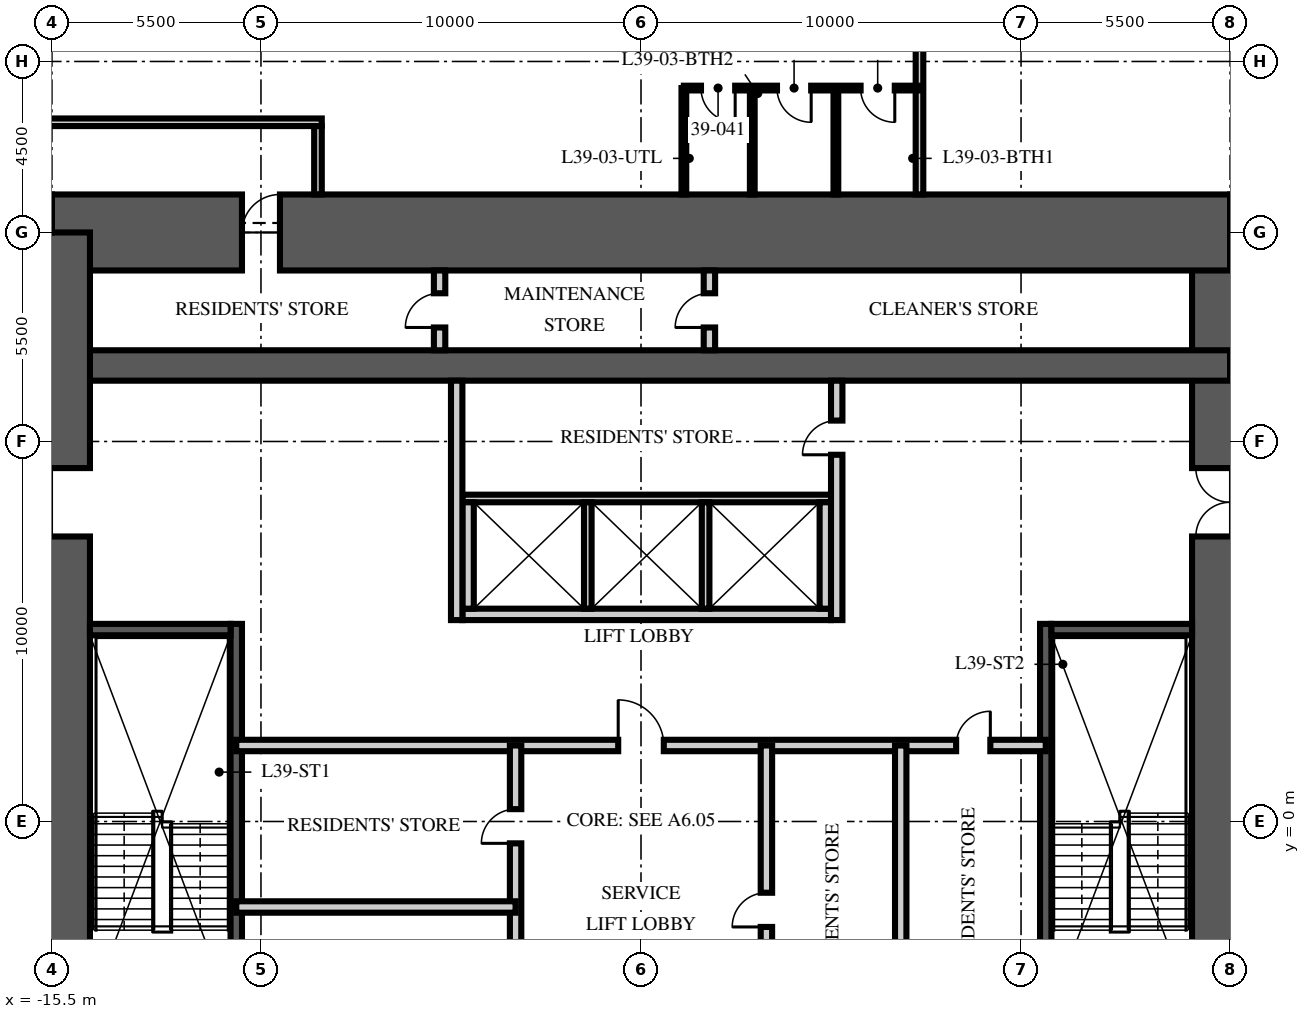
"""IFC4 building model, lengths in metres.
Left out: names, types, materials, properties, quantities, classifications, styles, units other than length and angle.
Written with IfcOpenShell. Run it as: python <this file> out.ifc"""

import sys

from ifc_helpers import new_model, si_unit, direction, frame, frame_2d, origin, place, context, subcontext, project, spatial, rectangle, extrude, element, fill, save


model = new_model("IFC4")
c1 = context("Model", 3, precision=1e-05, world=origin(), true_north=direction((0.0, 1.0)))
c2 = subcontext(c1, "Body", "Model", "MODEL_VIEW")
j1 = project(units=[si_unit("LENGTHUNIT", "METRE"), si_unit("PLANEANGLEUNIT", "RADIAN")], contexts=[c1])
p1 = place(None, origin())
s1 = spatial("IfcSite", under=j1, at=p1, CompositionType="ELEMENT")
p2 = place(p1, origin())
s2 = spatial("IfcBuilding", under=s1, at=p2, CompositionType="ELEMENT")
p3 = place(p2, frame((0.0, 0.0, 156.0)))
s3 = spatial("IfcBuildingStorey", under=s2, at=p3, CompositionType="ELEMENT", Elevation=156.0)
p4 = place(p3, frame((15.5, -15.5, -0.25), z_axis=(0.0, 0.0, 1.0), x_axis=(0.0, 1.0, 0.0)))
e1 = element("IfcWall", 1, at=p4, inside=s3, PredefinedType="SHEAR", context=c2, shape_type="SweptSolid", body=[
    extrude(rectangle(XDim=31.0, YDim=2.0, at=frame_2d((15.5, 0.0))), origin(), (0.0, 0.0, 1.0), 3.75),
])
p5 = place(p4, frame((6.5, 0.0, 0.25)))
e2 = element("IfcOpeningElement", 2, at=p5, cuts=e1, PredefinedType="OPENING", context=c2, shape_type="SweptSolid", body=[
    extrude(rectangle(XDim=1.2, YDim=2.1, at=frame_2d((0.6, 1.05))), frame((0.0, 1.01, 0.0), z_axis=(0.0, -1.0, 0.0), x_axis=(1.0, 0.0, 0.0)), (0.0, 0.0, 1.0), 2.02),
])
p6 = place(p4, frame((23.0, 0.0, 0.25)))
e3 = element("IfcOpeningElement", 3, at=p6, cuts=e1, PredefinedType="OPENING", context=c2, shape_type="SweptSolid", body=[
    extrude(rectangle(XDim=1.8, YDim=2.1, at=frame_2d((0.9, 1.05))), frame((0.0, 1.01, 0.0), z_axis=(0.0, -1.0, 0.0), x_axis=(1.0, 0.0, 0.0)), (0.0, 0.0, 1.0), 2.02),
])
p7 = place(p3, frame((-15.5, 15.5, -0.25), z_axis=(0.0, 0.0, 1.0), x_axis=(1.0, 0.0, 0.0)))
e4 = element("IfcWall", 4, at=p7, inside=s3, PredefinedType="SHEAR", context=c2, shape_type="SweptSolid", body=[
    extrude(rectangle(XDim=31.0, YDim=2.0, at=frame_2d((15.5, 0.0))), origin(), (0.0, 0.0, 1.0), 3.75),
])
p8 = place(p7, frame((5.0, 0.0, 0.25)))
e5 = element("IfcOpeningElement", 5, at=p8, cuts=e4, PredefinedType="OPENING", context=c2, shape_type="SweptSolid", body=[
    extrude(rectangle(XDim=1.0, YDim=2.1, at=frame_2d((0.5, 1.05))), frame((0.0, 1.01, 0.0), z_axis=(0.0, -1.0, 0.0), x_axis=(1.0, 0.0, 0.0)), (0.0, 0.0, 1.0), 2.02),
])
p9 = place(p3, frame((-15.5, 12.0, -0.25), z_axis=(0.0, 0.0, 1.0), x_axis=(1.0, 0.0, 0.0)))
e6 = element("IfcWall", 6, at=p9, inside=s3, PredefinedType="SHEAR", context=c2, shape_type="SweptSolid", body=[
    extrude(rectangle(XDim=31.0, YDim=0.8, at=frame_2d((15.5, 0.0))), origin(), (0.0, 0.0, 1.0), 3.75),
])
p10 = place(p3, frame((-15.5, -15.5, -0.25), z_axis=(0.0, 0.0, 1.0), x_axis=(0.0, 1.0, 0.0)))
e7 = element("IfcWall", 7, at=p10, inside=s3, PredefinedType="SHEAR", context=c2, shape_type="SweptSolid", body=[
    extrude(rectangle(XDim=31.0, YDim=2.0, at=frame_2d((15.5, 0.0))), origin(), (0.0, 0.0, 1.0), 3.75),
])
p11 = place(p10, frame((6.5, 0.0, 0.25)))
e8 = element("IfcOpeningElement", 8, at=p11, cuts=e7, PredefinedType="OPENING", context=c2, shape_type="SweptSolid", body=[
    extrude(rectangle(XDim=1.2, YDim=2.1, at=frame_2d((0.6, 1.05))), frame((0.0, 1.01, 0.0), z_axis=(0.0, -1.0, 0.0), x_axis=(1.0, 0.0, 0.0)), (0.0, 0.0, 1.0), 2.02),
])
p12 = place(p10, frame((23.0, 0.0, 0.25)))
e9 = element("IfcOpeningElement", 9, at=p12, cuts=e7, PredefinedType="OPENING", context=c2, shape_type="SweptSolid", body=[
    extrude(rectangle(XDim=1.8, YDim=2.1, at=frame_2d((0.9, 1.05))), frame((0.0, 1.01, 0.0), z_axis=(0.0, -1.0, 0.0), x_axis=(1.0, 0.0, 0.0)), (0.0, 0.0, 1.0), 2.02),
])
p13 = place(p3, frame((-10.65, -4.9, 0.0), z_axis=(0.0, 0.0, 1.0), x_axis=(0.0, 1.0, 0.0)))
e10 = element("IfcWall", 10, at=p13, inside=s3, PredefinedType="SOLIDWALL", context=c2, shape_type="SweptSolid", body=[
    extrude(rectangle(XDim=10.1, YDim=0.3, at=frame_2d((5.05, 0.0))), origin(), (0.0, 0.0, 1.0), 3.5),
])
p14 = place(p3, frame((-14.5, 5.05, 0.0), z_axis=(0.0, 0.0, 1.0), x_axis=(1.0, 0.0, 0.0)))
e11 = element("IfcWall", 11, at=p14, inside=s3, PredefinedType="SOLIDWALL", context=c2, shape_type="SweptSolid", body=[
    extrude(rectangle(XDim=3.7, YDim=0.3, at=frame_2d((1.85, 0.0))), origin(), (0.0, 0.0, 1.0), 3.5),
])
p15 = place(p3, frame((10.65, -4.9, 0.0), z_axis=(0.0, 0.0, 1.0), x_axis=(0.0, 1.0, 0.0)))
e12 = element("IfcWall", 12, at=p15, inside=s3, PredefinedType="SOLIDWALL", context=c2, shape_type="SweptSolid", body=[
    extrude(rectangle(XDim=10.1, YDim=0.3, at=frame_2d((5.05, 0.0))), origin(), (0.0, 0.0, 1.0), 3.5),
])
p16 = place(p3, frame((14.5, 5.05, 0.0), z_axis=(0.0, 0.0, 1.0), x_axis=(-1.0, 0.0, 0.0)))
e13 = element("IfcWall", 13, at=p16, inside=s3, PredefinedType="SOLIDWALL", context=c2, shape_type="SweptSolid", body=[
    extrude(rectangle(XDim=3.7, YDim=0.3, at=frame_2d((1.85, 0.0))), origin(), (0.0, 0.0, 1.0), 3.5),
])
p17 = place(p3, frame((-4.7, 5.45, 0.0), z_axis=(0.0, 0.0, 1.0), x_axis=(1.0, 0.0, 0.0)))
e14 = element("IfcWall", 14, at=p17, inside=s3, PredefinedType="PARTITIONING", context=c2, shape_type="SweptSolid", body=[
    extrude(rectangle(XDim=9.7, YDim=0.3, at=frame_2d((4.85, 0.0))), origin(), (0.0, 0.0, 1.0), 3.5),
])
p18 = place(p3, frame((-4.7, 8.5, 0.0), z_axis=(0.0, 0.0, 1.0), x_axis=(1.0, 0.0, 0.0)))
e15 = element("IfcWall", 15, at=p18, inside=s3, PredefinedType="PARTITIONING", context=c2, shape_type="SweptSolid", body=[
    extrude(rectangle(XDim=9.7, YDim=0.2, at=frame_2d((4.85, 0.0))), origin(), (0.0, 0.0, 1.0), 3.5),
])
for number, where, z_axis, x_axis in (
    (16, (-4.55, 5.6, 0.0), (0.0, 0.0, 1.0), (0.0, 1.0, 0.0)),
    (17, (4.85, 5.6, 0.0), (0.0, 0.0, 1.0), (0.0, 1.0, 0.0)),
):
    element("IfcWall", number, at=place(p3, frame(where, z_axis=z_axis, x_axis=x_axis)), inside=s3, PredefinedType="PARTITIONING", context=c2, shape_type="SweptSolid", body=[
        extrude(rectangle(XDim=2.8, YDim=0.3, at=frame_2d((1.4, 0.0))), origin(), (0.0, 0.0, 1.0), 3.5),
    ])
for number, where, z_axis, x_axis in (
    (18, (-1.4, 5.6, 0.0), (0.0, 0.0, 1.0), (0.0, 1.0, 0.0)),
    (19, (1.7, 5.6, 0.0), (0.0, 0.0, 1.0), (0.0, 1.0, 0.0)),
):
    element("IfcWall", number, at=place(p3, frame(where, z_axis=z_axis, x_axis=x_axis)), inside=s3, PredefinedType="PARTITIONING", context=c2, shape_type="SweptSolid", body=[
        extrude(rectangle(XDim=2.8, YDim=0.2, at=frame_2d((1.4, 0.0))), origin(), (0.0, 0.0, 1.0), 3.5),
    ])
p19 = place(p3, frame((-10.65, 2.0, 0.0), z_axis=(0.0, 0.0, 1.0), x_axis=(1.0, 0.0, 0.0)))
e20 = element("IfcWall", 20, at=p19, inside=s3, PredefinedType="PARTITIONING", context=c2, shape_type="SweptSolid", body=[
    extrude(rectangle(XDim=21.3, YDim=0.3, at=frame_2d((10.65, 0.0))), origin(), (0.0, 0.0, 1.0), 3.5),
])
p20 = place(p19, frame((10.05, 0.0, 0.0)))
e21 = element("IfcOpeningElement", 21, at=p20, cuts=e20, PredefinedType="OPENING", context=c2, shape_type="SweptSolid", body=[
    extrude(rectangle(XDim=1.2, YDim=2.1, at=frame_2d((0.6, 1.05))), frame((0.0, 0.16, 0.0), z_axis=(0.0, -1.0, 0.0), x_axis=(1.0, 0.0, 0.0)), (0.0, 0.0, 1.0), 0.32),
])
p21 = place(p19, frame((18.942, 0.0, 0.0)))
e22 = element("IfcOpeningElement", 22, at=p21, cuts=e20, PredefinedType="OPENING", context=c2, shape_type="SweptSolid", body=[
    extrude(rectangle(XDim=0.9, YDim=2.1, at=frame_2d((0.45, 1.05))), frame((0.0, 0.16, 0.0), z_axis=(0.0, -1.0, 0.0), x_axis=(1.0, 0.0, 0.0)), (0.0, 0.0, 1.0), 0.32),
])
p22 = place(p3, frame((-3.3, -6.65, 0.0), z_axis=(0.0, 0.0, 1.0), x_axis=(0.0, 1.0, 0.0)))
e23 = element("IfcWall", 23, at=p22, inside=s3, PredefinedType="PARTITIONING", context=c2, shape_type="SweptSolid", body=[
    extrude(rectangle(XDim=8.65, YDim=0.3, at=frame_2d((4.325, 0.0))), origin(), (0.0, 0.0, 1.0), 3.5),
])
p23 = place(p22, frame((1.75, 0.0, 0.0)))
e24 = element("IfcOpeningElement", 24, at=p23, cuts=e23, PredefinedType="OPENING", context=c2, shape_type="SweptSolid", body=[
    extrude(rectangle(XDim=0.9, YDim=2.1, at=frame_2d((0.45, 1.05))), frame((0.0, 0.16, 0.0), z_axis=(0.0, -1.0, 0.0), x_axis=(1.0, 0.0, 0.0)), (0.0, 0.0, 1.0), 0.32),
])
p24 = place(p22, frame((6.075, 0.0, 0.0)))
e25 = element("IfcOpeningElement", 25, at=p24, cuts=e23, PredefinedType="OPENING", context=c2, shape_type="SweptSolid", body=[
    extrude(rectangle(XDim=0.9, YDim=2.1, at=frame_2d((0.45, 1.05))), frame((0.0, 0.16, 0.0), z_axis=(0.0, -1.0, 0.0), x_axis=(1.0, 0.0, 0.0)), (0.0, 0.0, 1.0), 0.32),
])
p25 = place(p3, frame((3.3, -6.65, 0.0), z_axis=(0.0, 0.0, 1.0), x_axis=(0.0, 1.0, 0.0)))
e26 = element("IfcWall", 26, at=p25, inside=s3, PredefinedType="PARTITIONING", context=c2, shape_type="SweptSolid", body=[
    extrude(rectangle(XDim=8.65, YDim=0.3, at=frame_2d((4.325, 0.0))), origin(), (0.0, 0.0, 1.0), 3.5),
])
p26 = place(p25, frame((3.875, 0.0, 0.0)))
e27 = element("IfcOpeningElement", 27, at=p26, cuts=e26, PredefinedType="OPENING", context=c2, shape_type="SweptSolid", body=[
    extrude(rectangle(XDim=0.9, YDim=2.1, at=frame_2d((0.45, 1.05))), frame((0.0, 0.16, 0.0), z_axis=(0.0, -1.0, 0.0), x_axis=(1.0, 0.0, 0.0)), (0.0, 0.0, 1.0), 0.32),
])
p27 = place(p3, frame((-10.65, -2.25, 0.0), z_axis=(0.0, 0.0, 1.0), x_axis=(1.0, 0.0, 0.0)))
e28 = element("IfcWall", 28, at=p27, inside=s3, PredefinedType="PARTITIONING", context=c2, shape_type="SweptSolid", body=[
    extrude(rectangle(XDim=7.35, YDim=0.3, at=frame_2d((3.675, 0.0))), origin(), (0.0, 0.0, 1.0), 3.5),
])
p28 = place(p3, frame((6.834, -6.65, 0.0), z_axis=(0.0, 0.0, 1.0), x_axis=(0.0, 1.0, 0.0)))
e29 = element("IfcWall", 29, at=p28, inside=s3, PredefinedType="PARTITIONING", context=c2, shape_type="SweptSolid", body=[
    extrude(rectangle(XDim=8.65, YDim=0.3, at=frame_2d((4.325, 0.0))), origin(), (0.0, 0.0, 1.0), 3.5),
])
p29 = place(p3, frame((-4.85, 5.3, 0.0), z_axis=(0.0, 0.0, 1.0), x_axis=(0.0, 1.0, 0.0)))
e30 = element("IfcWall", 30, at=p29, inside=s3, PredefinedType="PARTITIONING", context=c2, shape_type="SweptSolid", body=[
    extrude(rectangle(XDim=6.3, YDim=0.3, at=frame_2d((3.15, 0.0))), origin(), (0.0, 0.0, 1.0), 3.5),
])
p30 = place(p3, frame((5.15, 5.3, 0.0), z_axis=(0.0, 0.0, 1.0), x_axis=(0.0, 1.0, 0.0)))
e31 = element("IfcWall", 31, at=p30, inside=s3, PredefinedType="PARTITIONING", context=c2, shape_type="SweptSolid", body=[
    extrude(rectangle(XDim=6.3, YDim=0.3, at=frame_2d((3.15, 0.0))), origin(), (0.0, 0.0, 1.0), 3.5),
])
p31 = place(p30, frame((4.35, 0.0, 0.0)))
e32 = element("IfcOpeningElement", 32, at=p31, cuts=e31, PredefinedType="OPENING", context=c2, shape_type="SweptSolid", body=[
    extrude(rectangle(XDim=0.9, YDim=2.1, at=frame_2d((0.45, 1.05))), frame((0.0, 0.16, 0.0), z_axis=(0.0, -1.0, 0.0), x_axis=(1.0, 0.0, 0.0)), (0.0, 0.0, 1.0), 0.32),
])
p32 = place(p3, frame((-5.3, 12.4, 0.0), z_axis=(0.0, 0.0, 1.0), x_axis=(0.0, 1.0, 0.0)))
e33 = element("IfcWall", 33, at=p32, inside=s3, PredefinedType="PARTITIONING", context=c2, shape_type="SweptSolid", body=[
    extrude(rectangle(XDim=2.1, YDim=0.3, at=frame_2d((1.05, 0.0))), origin(), (0.0, 0.0, 1.0), 3.5),
])
p33 = place(p32, frame((0.6, 0.0, 0.0)))
e34 = element("IfcOpeningElement", 34, at=p33, cuts=e33, PredefinedType="OPENING", context=c2, shape_type="SweptSolid", body=[
    extrude(rectangle(XDim=0.9, YDim=2.1, at=frame_2d((0.45, 1.05))), frame((0.0, 0.16, 0.0), z_axis=(0.0, -1.0, 0.0), x_axis=(1.0, 0.0, 0.0)), (0.0, 0.0, 1.0), 0.32),
])
p34 = place(p3, frame((1.8, 12.4, 0.0), z_axis=(0.0, 0.0, 1.0), x_axis=(0.0, 1.0, 0.0)))
e35 = element("IfcWall", 35, at=p34, inside=s3, PredefinedType="PARTITIONING", context=c2, shape_type="SweptSolid", body=[
    extrude(rectangle(XDim=2.1, YDim=0.3, at=frame_2d((1.05, 0.0))), origin(), (0.0, 0.0, 1.0), 3.5),
])
p35 = place(p34, frame((0.6, 0.0, 0.0)))
e36 = element("IfcOpeningElement", 36, at=p35, cuts=e35, PredefinedType="OPENING", context=c2, shape_type="SweptSolid", body=[
    extrude(rectangle(XDim=0.9, YDim=2.1, at=frame_2d((0.45, 1.05))), frame((0.0, 0.16, 0.0), z_axis=(0.0, -1.0, 0.0), x_axis=(1.0, 0.0, 0.0)), (0.0, 0.0, 1.0), 0.32),
])
p36 = place(p3, frame((-18.5, 18.4, 0.0), z_axis=(0.0, 0.0, 1.0), x_axis=(1.0, 0.0, 0.0)))
e37 = element("IfcWall", 37, at=p36, inside=s3, PredefinedType="PARTITIONING", context=c2, shape_type="SweptSolid", body=[
    extrude(rectangle(XDim=10.1, YDim=0.2, at=frame_2d((5.05, 0.0))), origin(), (0.0, 0.0, 1.0), 2.3),
])
p37 = place(p36, frame((1.0, 0.0, 0.0)))
e38 = element("IfcOpeningElement", 38, at=p37, cuts=e37, PredefinedType="OPENING", context=c2, shape_type="SweptSolid", body=[
    extrude(rectangle(XDim=1.0, YDim=2.2, at=frame_2d((0.5, 1.1))), frame((0.0, 0.11, 0.0), z_axis=(0.0, -1.0, 0.0), x_axis=(1.0, 0.0, 0.0)), (0.0, 0.0, 1.0), 0.22),
])
p38 = place(p3, frame((-8.5, 18.3, 0.0), z_axis=(0.0, 0.0, 1.0), x_axis=(0.0, -1.0, 0.0)))
e39 = element("IfcWall", 39, at=p38, inside=s3, PredefinedType="PARTITIONING", context=c2, shape_type="SweptSolid", body=[
    extrude(rectangle(XDim=1.8, YDim=0.2, at=frame_2d((0.9, 0.0))), origin(), (0.0, 0.0, 1.0), 3.5),
])
p39 = place(p3, frame((7.328, 16.5, 0.0), z_axis=(0.0, 0.0, 1.0), x_axis=(0.0, 1.0, 0.0)))
e40 = element("IfcWall", 40, at=p39, inside=s3, PredefinedType="PARTITIONING", context=c2, shape_type="SweptSolid", body=[
    extrude(rectangle(XDim=11.9, YDim=0.2, at=frame_2d((5.95, 0.0))), origin(), (0.0, 0.0, 1.0), 2.81),
])
p40 = place(p3, frame((7.328, 19.3, 0.0), z_axis=(0.0, 0.0, 1.0), x_axis=(-1.0, 0.0, 0.0)))
e41 = element("IfcWall", 41, at=p40, inside=s3, PredefinedType="PARTITIONING", context=c2, shape_type="SweptSolid", body=[
    extrude(rectangle(XDim=6.2, YDim=0.125, at=frame_2d((3.1, 0.0))), origin(), (0.0, 0.0, 1.0), 2.81),
])
p41 = place(p40, frame((0.65, 0.0, 0.0)))
e42 = element("IfcOpeningElement", 42, at=p41, cuts=e41, PredefinedType="OPENING", context=c2, shape_type="SweptSolid", body=[
    extrude(rectangle(XDim=0.9, YDim=2.1, at=frame_2d((0.45, 1.05))), frame((0.0, 0.073, 0.0), z_axis=(0.0, -1.0, 0.0), x_axis=(1.0, 0.0, 0.0)), (0.0, 0.0, 1.0), 0.145),
])
p42 = place(p40, frame((2.85, 0.0, 0.0)))
e43 = element("IfcOpeningElement", 43, at=p42, cuts=e41, PredefinedType="OPENING", context=c2, shape_type="SweptSolid", body=[
    extrude(rectangle(XDim=0.9, YDim=2.1, at=frame_2d((0.45, 1.05))), frame((0.0, 0.073, 0.0), z_axis=(0.0, -1.0, 0.0), x_axis=(1.0, 0.0, 0.0)), (0.0, 0.0, 1.0), 0.145),
])
p43 = place(p40, frame((4.85, 0.0, 0.0)))
e44 = element("IfcOpeningElement", 44, at=p43, cuts=e41, PredefinedType="OPENING", context=c2, shape_type="SweptSolid", body=[
    extrude(rectangle(XDim=0.9, YDim=2.1, at=frame_2d((0.45, 1.05))), frame((0.0, 0.073, 0.0), z_axis=(0.0, -1.0, 0.0), x_axis=(1.0, 0.0, 0.0)), (0.0, 0.0, 1.0), 0.145),
])
for number, where, z_axis, x_axis in (
    (45, (5.128, 16.5, 0.0), (0.0, 0.0, 1.0), (0.0, 1.0, 0.0)),
    (46, (2.928, 16.5, 0.0), (0.0, 0.0, 1.0), (0.0, 1.0, 0.0)),
    (47, (1.128, 16.5, 0.0), (0.0, 0.0, 1.0), (0.0, 1.0, 0.0)),
):
    element("IfcWall", number, at=place(p3, frame(where, z_axis=z_axis, x_axis=x_axis)), inside=s3, PredefinedType="PARTITIONING", context=c2, shape_type="SweptSolid", body=[
        extrude(rectangle(XDim=2.8, YDim=0.125, at=frame_2d((1.4, 0.0))), origin(), (0.0, 0.0, 1.0), 3.5),
    ])
p44 = place(p12, origin())
e48 = element("IfcDoor", 48, at=p44, inside=s3, OperationType="DOUBLE_DOOR_SINGLE_SWING", PredefinedType="DOOR", context=c2, shape_type="SweptSolid", body=[
    extrude(rectangle(XDim=1.8, YDim=2.1, at=frame_2d((0.9, 1.05))), frame((0.0, 0.025, 0.0), z_axis=(0.0, -1.0, 0.0), x_axis=(1.0, 0.0, 0.0)), (0.0, 0.0, 1.0), 0.05),
])
fill(e9, e48)
p45 = place(p6, origin())
e49 = element("IfcDoor", 49, at=p45, inside=s3, OperationType="DOUBLE_DOOR_SINGLE_SWING", PredefinedType="DOOR", context=c2, shape_type="SweptSolid", body=[
    extrude(rectangle(XDim=1.8, YDim=2.1, at=frame_2d((0.9, 1.05))), frame((0.0, 0.025, 0.0), z_axis=(0.0, -1.0, 0.0), x_axis=(1.0, 0.0, 0.0)), (0.0, 0.0, 1.0), 0.05),
])
fill(e3, e49)
p46 = place(p20, origin())
e50 = element("IfcDoor", 50, at=p46, inside=s3, OperationType="SINGLE_SWING_LEFT", PredefinedType="DOOR", context=c2, shape_type="SweptSolid", body=[
    extrude(rectangle(XDim=1.2, YDim=2.1, at=frame_2d((0.6, 1.05))), frame((0.0, 0.025, 0.0), z_axis=(0.0, -1.0, 0.0), x_axis=(1.0, 0.0, 0.0)), (0.0, 0.0, 1.0), 0.05),
])
fill(e21, e50)
p47 = place(p24, origin())
e51 = element("IfcDoor", 51, at=p47, inside=s3, OperationType="SINGLE_SWING_LEFT", PredefinedType="DOOR", context=c2, shape_type="SweptSolid", body=[
    extrude(rectangle(XDim=0.9, YDim=2.1, at=frame_2d((0.45, 1.05))), frame((0.0, 0.025, 0.0), z_axis=(0.0, -1.0, 0.0), x_axis=(1.0, 0.0, 0.0)), (0.0, 0.0, 1.0), 0.05),
])
fill(e25, e51)
p48 = place(p26, origin())
e52 = element("IfcDoor", 52, at=p48, inside=s3, OperationType="SINGLE_SWING_LEFT", PredefinedType="DOOR", context=c2, shape_type="SweptSolid", body=[
    extrude(rectangle(XDim=0.9, YDim=2.1, at=frame_2d((0.45, 1.05))), frame((0.0, 0.025, 0.0), z_axis=(0.0, -1.0, 0.0), x_axis=(1.0, 0.0, 0.0)), (0.0, 0.0, 1.0), 0.05),
])
fill(e27, e52)
p49 = place(p21, origin())
e53 = element("IfcDoor", 53, at=p49, inside=s3, OperationType="SINGLE_SWING_RIGHT", PredefinedType="DOOR", context=c2, shape_type="SweptSolid", body=[
    extrude(rectangle(XDim=0.9, YDim=2.1, at=frame_2d((0.45, 1.05))), frame((0.0, 0.025, 0.0), z_axis=(0.0, -1.0, 0.0), x_axis=(1.0, 0.0, 0.0)), (0.0, 0.0, 1.0), 0.05),
])
fill(e22, e53)
p50 = place(p31, origin())
e54 = element("IfcDoor", 54, at=p50, inside=s3, OperationType="SINGLE_SWING_LEFT", PredefinedType="DOOR", context=c2, shape_type="SweptSolid", body=[
    extrude(rectangle(XDim=0.9, YDim=2.1, at=frame_2d((0.45, 1.05))), frame((0.0, 0.025, 0.0), z_axis=(0.0, -1.0, 0.0), x_axis=(1.0, 0.0, 0.0)), (0.0, 0.0, 1.0), 0.05),
])
fill(e32, e54)
p51 = place(p33, origin())
e55 = element("IfcDoor", 55, at=p51, inside=s3, OperationType="SINGLE_SWING_LEFT", PredefinedType="DOOR", context=c2, shape_type="SweptSolid", body=[
    extrude(rectangle(XDim=0.9, YDim=2.1, at=frame_2d((0.45, 1.05))), frame((0.0, 0.025, 0.0), z_axis=(0.0, -1.0, 0.0), x_axis=(1.0, 0.0, 0.0)), (0.0, 0.0, 1.0), 0.05),
])
fill(e34, e55)
p52 = place(p35, origin())
e56 = element("IfcDoor", 56, at=p52, inside=s3, OperationType="SINGLE_SWING_LEFT", PredefinedType="DOOR", context=c2, shape_type="SweptSolid", body=[
    extrude(rectangle(XDim=0.9, YDim=2.1, at=frame_2d((0.45, 1.05))), frame((0.0, 0.025, 0.0), z_axis=(0.0, -1.0, 0.0), x_axis=(1.0, 0.0, 0.0)), (0.0, 0.0, 1.0), 0.05),
])
fill(e36, e56)
p53 = place(p8, origin())
e57 = element("IfcDoor", 57, at=p53, inside=s3, OperationType="SINGLE_SWING_RIGHT", PredefinedType="DOOR", context=c2, shape_type="SweptSolid", body=[
    extrude(rectangle(XDim=1.0, YDim=2.1, at=frame_2d((0.5, 1.05))), frame((0.0, 0.025, 0.0), z_axis=(0.0, -1.0, 0.0), x_axis=(1.0, 0.0, 0.0)), (0.0, 0.0, 1.0), 0.05),
])
fill(e5, e57)
p54 = place(p41, origin())
e58 = element("IfcDoor", 58, at=p54, inside=s3, OperationType="SINGLE_SWING_LEFT", PredefinedType="DOOR", context=c2, shape_type="SweptSolid", body=[
    extrude(rectangle(XDim=0.9, YDim=2.1, at=frame_2d((0.45, 1.05))), frame((0.0, 0.025, 0.0), z_axis=(0.0, -1.0, 0.0), x_axis=(1.0, 0.0, 0.0)), (0.0, 0.0, 1.0), 0.05),
])
fill(e42, e58)
p55 = place(p42, origin())
e59 = element("IfcDoor", 59, at=p55, inside=s3, OperationType="SINGLE_SWING_LEFT", PredefinedType="DOOR", context=c2, shape_type="SweptSolid", body=[
    extrude(rectangle(XDim=0.9, YDim=2.1, at=frame_2d((0.45, 1.05))), frame((0.0, 0.025, 0.0), z_axis=(0.0, -1.0, 0.0), x_axis=(1.0, 0.0, 0.0)), (0.0, 0.0, 1.0), 0.05),
])
fill(e43, e59)
p56 = place(p43, origin())
e60 = element("IfcDoor", 60, at=p56, inside=s3, OperationType="SINGLE_SWING_LEFT", PredefinedType="DOOR", context=c2, shape_type="SweptSolid", body=[
    extrude(rectangle(XDim=0.9, YDim=2.1, at=frame_2d((0.45, 1.05))), frame((0.0, 0.025, 0.0), z_axis=(0.0, -1.0, 0.0), x_axis=(1.0, 0.0, 0.0)), (0.0, 0.0, 1.0), 0.05),
])
fill(e44, e60)
save(model, sys.argv[1])
